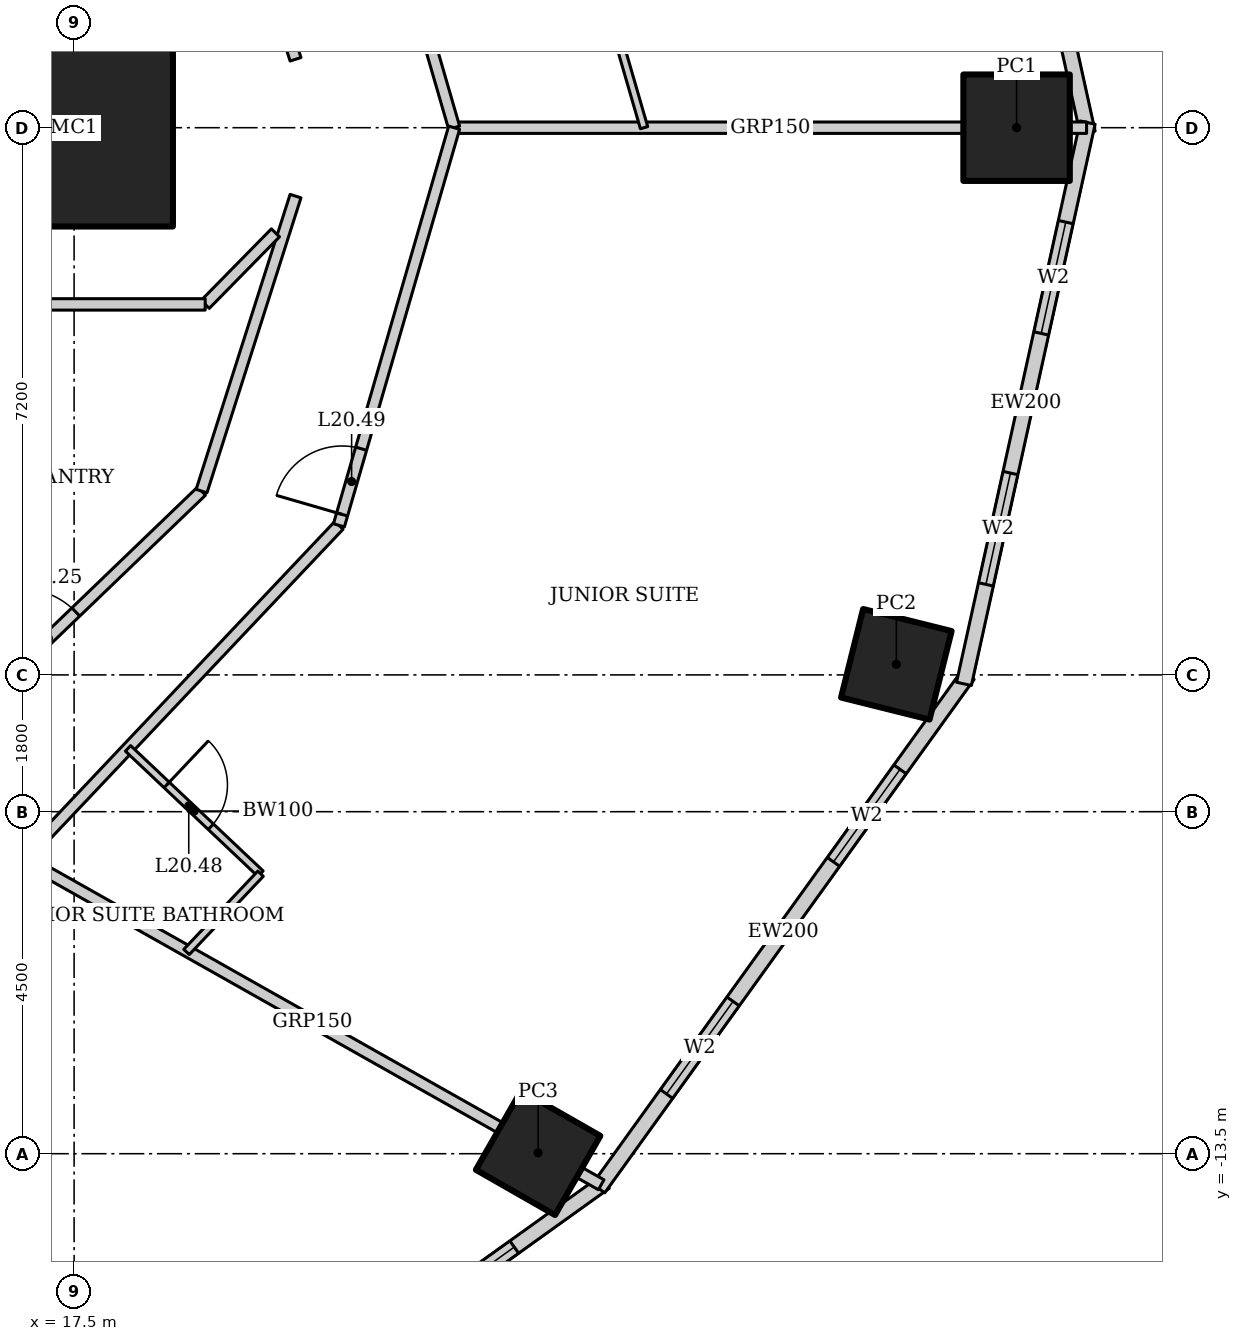
"""IFC4 building model, lengths in metres.
Left out: names, types, materials, properties, quantities, classifications, styles, units other than length and angle.
Written with IfcOpenShell. Run it as: python <this file> out.ifc"""

import sys

from ifc_helpers import new_model, si_unit, direction, frame, frame_2d, origin, origin_2d, place, context, subcontext, project, spatial, rectangle, hollow_rectangle, extrude, element, fill, save


model = new_model("IFC4")
c1 = context("Model", 3, precision=1e-05, world=origin(), true_north=direction((0.0, 1.0)))
c2 = subcontext(c1, "Body", "Model", "MODEL_VIEW")
j1 = project(units=[si_unit("LENGTHUNIT", "METRE"), si_unit("PLANEANGLEUNIT", "RADIAN")], contexts=[c1])
p1 = place(None, origin())
s1 = spatial("IfcSite", under=j1, at=p1, CompositionType="ELEMENT")
p2 = place(p1, origin())
s2 = spatial("IfcBuilding", under=s1, at=p2, CompositionType="ELEMENT")
p3 = place(p2, frame((0.0, 0.0, 87.4)))
s3 = spatial("IfcBuildingStorey", under=s2, at=p3, CompositionType="ELEMENT", Elevation=87.4)
p4 = place(p3, frame((17.5, 0.0, 0.0), z_axis=(0.0, 0.0, 1.0), x_axis=(1.0, 0.0, 0.0)))
e1 = element("IfcColumn", 1, at=p4, inside=s3, PredefinedType="COLUMN", context=c2, shape_type="SweptSolid", body=[
    extrude(hollow_rectangle(XDim=2.6, YDim=2.6, WallThickness=0.13, at=origin_2d()), origin(), (0.0, 0.0, 1.0), 3.6),
])
p5 = place(p3, frame((29.9, 0.0, 0.0), z_axis=(0.0, 0.0, 1.0), x_axis=(1.0, 0.0, 0.0)))
e2 = element("IfcColumn", 2, at=p5, inside=s3, PredefinedType="COLUMN", context=c2, shape_type="SweptSolid", body=[
    extrude(hollow_rectangle(XDim=1.4, YDim=1.4, WallThickness=0.1, at=origin_2d()), origin(), (0.0, 0.0, 1.0), 3.6),
])
p6 = place(p3, frame((23.605, -13.489, 0.0), z_axis=(0.0, 0.0, 1.0), x_axis=(0.496139221777, 0.86824298017, 0.0)))
e3 = element("IfcColumn", 3, at=p6, inside=s3, PredefinedType="COLUMN", context=c2, shape_type="SweptSolid", body=[
    extrude(hollow_rectangle(XDim=1.2, YDim=1.2, WallThickness=0.12, at=origin_2d()), origin(), (0.0, 0.0, 1.0), 3.6),
])
p7 = place(p3, frame((28.318, -7.06, 0.0), z_axis=(0.0, 0.0, 1.0), x_axis=(0.2419218956, 0.970295726276, 0.0)))
e4 = element("IfcColumn", 4, at=p7, inside=s3, PredefinedType="COLUMN", context=c2, shape_type="SweptSolid", body=[
    extrude(hollow_rectangle(XDim=1.2, YDim=1.2, WallThickness=0.1, at=origin_2d()), origin(), (0.0, 0.0, 1.0), 3.6),
])
p8 = place(p3, frame((30.835, -0.067, 0.0), z_axis=(0.0, 0.0, 1.0), x_axis=(-0.215238065514, 0.976561608478, 0.0)))
e5 = element("IfcWall", 5, at=p8, inside=s3, PredefinedType="SOLIDWALL", context=c2, shape_type="SweptSolid", body=[
    extrude(rectangle(XDim=7.562, YDim=0.2, at=frame_2d((3.781, 0.0))), origin(), (0.0, 0.0, 1.0), 3.45),
])
p9 = place(p8, frame((1.341, 0.0, 0.5)))
e6 = element("IfcOpeningElement", 6, at=p9, cuts=e5, PredefinedType="OPENING", context=c2, shape_type="SweptSolid", body=[
    extrude(rectangle(XDim=1.5, YDim=2.2, at=frame_2d((0.75, 1.1))), frame((0.0, 0.11, 0.0), z_axis=(0.0, -1.0, 0.0), x_axis=(1.0, 0.0, 0.0)), (0.0, 0.0, 1.0), 0.22),
])
p10 = place(p8, frame((4.722, 0.0, 0.5)))
e7 = element("IfcOpeningElement", 7, at=p10, cuts=e5, PredefinedType="OPENING", context=c2, shape_type="SweptSolid", body=[
    extrude(rectangle(XDim=1.5, YDim=2.2, at=frame_2d((0.75, 1.1))), frame((0.0, 0.11, 0.0), z_axis=(0.0, -1.0, 0.0), x_axis=(1.0, 0.0, 0.0)), (0.0, 0.0, 1.0), 0.22),
])
p11 = place(p3, frame((17.929, -18.572, 0.0), z_axis=(0.0, 0.0, 1.0), x_axis=(0.812791321576, 0.582554948112, 0.0)))
e8 = element("IfcWall", 8, at=p11, inside=s3, PredefinedType="SOLIDWALL", context=c2, shape_type="SweptSolid", body=[
    extrude(rectangle(XDim=8.063, YDim=0.2, at=frame_2d((4.032, 0.0))), origin(), (0.0, 0.0, 1.0), 3.45),
])
p12 = place(p11, frame((1.466, 0.0, 0.5)))
e9 = element("IfcOpeningElement", 9, at=p12, cuts=e8, PredefinedType="OPENING", context=c2, shape_type="SweptSolid", body=[
    extrude(rectangle(XDim=1.5, YDim=2.2, at=frame_2d((0.75, 1.1))), frame((0.0, 0.11, 0.0), z_axis=(0.0, -1.0, 0.0), x_axis=(1.0, 0.0, 0.0)), (0.0, 0.0, 1.0), 0.22),
])
p13 = place(p11, frame((5.097, 0.0, 0.5)))
e10 = element("IfcOpeningElement", 10, at=p13, cuts=e8, PredefinedType="OPENING", context=c2, shape_type="SweptSolid", body=[
    extrude(rectangle(XDim=1.5, YDim=2.2, at=frame_2d((0.75, 1.1))), frame((0.0, 0.11, 0.0), z_axis=(0.0, -1.0, 0.0), x_axis=(1.0, 0.0, 0.0)), (0.0, 0.0, 1.0), 0.22),
])
p14 = place(p3, frame((24.4, -13.957, 0.0), z_axis=(0.0, 0.0, 1.0), x_axis=(0.583937613703, 0.811798536155, 0.0)))
e11 = element("IfcWall", 11, at=p14, inside=s3, PredefinedType="SOLIDWALL", context=c2, shape_type="SweptSolid", body=[
    extrude(rectangle(XDim=8.323, YDim=0.2, at=frame_2d((4.162, 0.0))), origin(), (0.0, 0.0, 1.0), 3.45),
])
p15 = place(p14, frame((1.531, 0.0, 0.5)))
e12 = element("IfcOpeningElement", 12, at=p15, cuts=e11, PredefinedType="OPENING", context=c2, shape_type="SweptSolid", body=[
    extrude(rectangle(XDim=1.5, YDim=2.2, at=frame_2d((0.75, 1.1))), frame((0.0, 0.11, 0.0), z_axis=(0.0, -1.0, 0.0), x_axis=(1.0, 0.0, 0.0)), (0.0, 0.0, 1.0), 0.22),
])
p16 = place(p14, frame((5.292, 0.0, 0.5)))
e13 = element("IfcOpeningElement", 13, at=p16, cuts=e11, PredefinedType="OPENING", context=c2, shape_type="SweptSolid", body=[
    extrude(rectangle(XDim=1.5, YDim=2.2, at=frame_2d((0.75, 1.1))), frame((0.0, 0.11, 0.0), z_axis=(0.0, -1.0, 0.0), x_axis=(1.0, 0.0, 0.0)), (0.0, 0.0, 1.0), 0.22),
])
p17 = place(p3, frame((29.208, -7.318, 0.0), z_axis=(0.0, 0.0, 1.0), x_axis=(0.215238065514, 0.976561608478, 0.0)))
e14 = element("IfcWall", 14, at=p17, inside=s3, PredefinedType="SOLIDWALL", context=c2, shape_type="SweptSolid", body=[
    extrude(rectangle(XDim=7.562, YDim=0.2, at=frame_2d((3.781, 0.0))), origin(), (0.0, 0.0, 1.0), 3.45),
])
p18 = place(p17, frame((1.341, 0.0, 0.5)))
e15 = element("IfcOpeningElement", 15, at=p18, cuts=e14, PredefinedType="OPENING", context=c2, shape_type="SweptSolid", body=[
    extrude(rectangle(XDim=1.5, YDim=2.2, at=frame_2d((0.75, 1.1))), frame((0.0, 0.11, 0.0), z_axis=(0.0, -1.0, 0.0), x_axis=(1.0, 0.0, 0.0)), (0.0, 0.0, 1.0), 0.22),
])
p19 = place(p17, frame((4.722, 0.0, 0.5)))
e16 = element("IfcOpeningElement", 16, at=p19, cuts=e14, PredefinedType="OPENING", context=c2, shape_type="SweptSolid", body=[
    extrude(rectangle(XDim=1.5, YDim=2.2, at=frame_2d((0.75, 1.1))), frame((0.0, 0.11, 0.0), z_axis=(0.0, -1.0, 0.0), x_axis=(1.0, 0.0, 0.0)), (0.0, 0.0, 1.0), 0.22),
])
p20 = place(p3, frame((30.821, 0.0, 0.0), z_axis=(0.0, 0.0, 1.0), x_axis=(-1.0, 0.0, 0.0)))
e17 = element("IfcWall", 17, at=p20, inside=s3, PredefinedType="PARTITIONING", context=c2, shape_type="SweptSolid", body=[
    extrude(rectangle(XDim=8.321, YDim=0.15, at=frame_2d((4.16, 0.0))), origin(), (0.0, 0.0, 1.0), 2.528),
])
p21 = place(p3, frame((24.435, -13.909, 0.0), z_axis=(0.0, 0.0, 1.0), x_axis=(-0.87090601027, 0.491449612143, 0.0)))
e18 = element("IfcWall", 18, at=p21, inside=s3, PredefinedType="PARTITIONING", context=c2, shape_type="SweptSolid", body=[
    extrude(rectangle(XDim=8.726, YDim=0.15, at=frame_2d((4.363, 0.0))), origin(), (0.0, 0.0, 1.0), 2.693),
])
p22 = place(p3, frame((22.5, 0.0, 0.0), z_axis=(0.0, 0.0, 1.0), x_axis=(-0.278247435376, 0.960509429785, 0.0)))
e19 = element("IfcWall", 19, at=p22, inside=s3, PredefinedType="PARTITIONING", context=c2, shape_type="SweptSolid", body=[
    extrude(rectangle(XDim=5.447, YDim=0.15, at=frame_2d((2.724, 0.0))), origin(), (0.0, 0.0, 1.0), 3.45),
])
p23 = place(p3, frame((16.835, -9.62, 0.0), z_axis=(0.0, 0.0, 1.0), x_axis=(0.687062608696, 0.726598218916, 0.0)))
e20 = element("IfcWall", 20, at=p23, inside=s3, PredefinedType="PARTITIONING", context=c2, shape_type="SweptSolid", body=[
    extrude(rectangle(XDim=6.039, YDim=0.15, at=frame_2d((3.02, 0.0))), origin(), (0.0, 0.0, 1.0), 3.45),
])
p24 = place(p3, frame((20.984, -5.232, 0.0), z_axis=(0.0, 0.0, 1.0), x_axis=(0.278247435376, 0.960509429785, 0.0)))
e21 = element("IfcWall", 21, at=p24, inside=s3, PredefinedType="PARTITIONING", context=c2, shape_type="SweptSolid", body=[
    extrude(rectangle(XDim=5.447, YDim=0.15, at=frame_2d((2.724, 0.0))), origin(), (0.0, 0.0, 1.0), 3.45),
])
p25 = place(p24, frame((0.15, 0.0, 0.0)))
e22 = element("IfcOpeningElement", 22, at=p25, cuts=e21, PredefinedType="OPENING", context=c2, shape_type="SweptSolid", body=[
    extrude(rectangle(XDim=0.9, YDim=2.1, at=frame_2d((0.45, 1.05))), frame((0.0, 0.085, 0.0), z_axis=(0.0, -1.0, 0.0), x_axis=(1.0, 0.0, 0.0)), (0.0, 0.0, 1.0), 0.17),
])
p26 = place(p3, frame((20.413, 0.9, 0.0), z_axis=(0.0, 0.0, 1.0), x_axis=(-0.303505448228, 0.952829702988, 0.0)))
e23 = element("IfcWall", 23, at=p26, inside=s3, PredefinedType="PARTITIONING", context=c2, shape_type="SweptSolid", body=[
    extrude(rectangle(XDim=4.073, YDim=0.15, at=frame_2d((2.037, 0.0))), origin(), (0.0, 0.0, 1.0), 3.45),
])
p27 = place(p3, frame((15.147, -8.656, 0.0), z_axis=(0.0, 0.0, 1.0), x_axis=(0.720837261072, 0.693104352209, 0.0)))
e24 = element("IfcWall", 24, at=p27, inside=s3, PredefinedType="PARTITIONING", context=c2, shape_type="SweptSolid", body=[
    extrude(rectangle(XDim=5.59, YDim=0.15, at=frame_2d((2.795, 0.0))), origin(), (0.0, 0.0, 1.0), 3.45),
])
p28 = place(p27, frame((2.295, 0.0, 0.0)))
e25 = element("IfcOpeningElement", 25, at=p28, cuts=e24, PredefinedType="OPENING", context=c2, shape_type="SweptSolid", body=[
    extrude(rectangle(XDim=1.0, YDim=2.1, at=frame_2d((0.5, 1.05))), frame((0.0, 0.085, 0.0), z_axis=(0.0, -1.0, 0.0), x_axis=(1.0, 0.0, 0.0)), (0.0, 0.0, 1.0), 0.17),
])
p29 = place(p3, frame((19.177, -4.781, 0.0), z_axis=(0.0, 0.0, 1.0), x_axis=(0.303505448228, 0.952829702988, 0.0)))
e26 = element("IfcWall", 26, at=p29, inside=s3, PredefinedType="PARTITIONING", context=c2, shape_type="SweptSolid", body=[
    extrude(rectangle(XDim=4.073, YDim=0.15, at=frame_2d((2.037, 0.0))), origin(), (0.0, 0.0, 1.0), 3.45),
])
p30 = place(p3, frame((24.249, 2.589, 0.0), z_axis=(0.0, 0.0, 1.0), x_axis=(0.278260412958, -0.960505670249, 0.0)))
e27 = element("IfcWall", 27, at=p30, inside=s3, PredefinedType="PARTITIONING", context=c2, shape_type="SweptSolid", body=[
    extrude(rectangle(XDim=2.695, YDim=0.1, at=frame_2d((1.348, 0.0))), origin(), (0.0, 0.0, 1.0), 3.45),
])
p31 = place(p3, frame((18.209, -8.167, 0.0), z_axis=(0.0, 0.0, 1.0), x_axis=(0.726567238928, -0.687095369885, 0.0)))
e28 = element("IfcWall", 28, at=p31, inside=s3, PredefinedType="PARTITIONING", context=c2, shape_type="SweptSolid", body=[
    extrude(rectangle(XDim=2.4, YDim=0.1, at=frame_2d((1.2, 0.0))), origin(), (0.0, 0.0, 1.0), 3.45),
])
p32 = place(p31, frame((0.7, 0.0, 0.0)))
e29 = element("IfcOpeningElement", 29, at=p32, cuts=e28, PredefinedType="OPENING", context=c2, shape_type="SweptSolid", body=[
    extrude(rectangle(XDim=0.8, YDim=2.1, at=frame_2d((0.4, 1.05))), frame((0.0, 0.06, 0.0), z_axis=(0.0, -1.0, 0.0), x_axis=(1.0, 0.0, 0.0)), (0.0, 0.0, 1.0), 0.12),
])
p33 = place(p3, frame((19.953, -9.816, 0.0), z_axis=(0.0, 0.0, 1.0), x_axis=(-0.687017997787, -0.726640399866, 0.0)))
e30 = element("IfcWall", 30, at=p33, inside=s3, PredefinedType="PARTITIONING", context=c2, shape_type="SweptSolid", body=[
    extrude(rectangle(XDim=1.417, YDim=0.1, at=frame_2d((0.708, 0.0))), origin(), (0.0, 0.0, 1.0), 3.45),
])
p34 = place(p3, frame((20.149, -1.384, 0.0), z_axis=(0.0, 0.0, 1.0), x_axis=(-0.700694560486, -0.713461374501, 0.0)))
e31 = element("IfcWall", 31, at=p34, inside=s3, PredefinedType="PARTITIONING", context=c2, shape_type="SweptSolid", body=[
    extrude(rectangle(XDim=1.32, YDim=0.15, at=frame_2d((0.66, 0.0))), origin(), (0.0, 0.0, 1.0), 3.45),
])
p35 = place(p3, frame((19.225, -2.325, 0.0), z_axis=(0.0, 0.0, 1.0), x_axis=(-1.0, 0.0, 0.0)))
e32 = element("IfcWall", 32, at=p35, inside=s3, PredefinedType="PARTITIONING", context=c2, shape_type="SweptSolid", body=[
    extrude(rectangle(XDim=3.449, YDim=0.15, at=frame_2d((1.725, 0.0))), origin(), (0.0, 0.0, 1.0), 3.45),
])
p36 = place(p13, origin())
e33 = element("IfcWindow", 33, at=p36, inside=s3, PartitioningType="SINGLE_PANEL", PredefinedType="WINDOW", context=c2, shape_type="SweptSolid", body=[
    extrude(rectangle(XDim=1.5, YDim=2.2, at=frame_2d((0.75, 1.1))), frame((0.0, 0.03, 0.0), z_axis=(0.0, -1.0, 0.0), x_axis=(1.0, 0.0, 0.0)), (0.0, 0.0, 1.0), 0.06),
])
fill(e10, e33)
p37 = place(p15, origin())
e34 = element("IfcWindow", 34, at=p37, inside=s3, PartitioningType="SINGLE_PANEL", PredefinedType="WINDOW", context=c2, shape_type="SweptSolid", body=[
    extrude(rectangle(XDim=1.5, YDim=2.2, at=frame_2d((0.75, 1.1))), frame((0.0, 0.03, 0.0), z_axis=(0.0, -1.0, 0.0), x_axis=(1.0, 0.0, 0.0)), (0.0, 0.0, 1.0), 0.06),
])
fill(e12, e34)
p38 = place(p16, origin())
e35 = element("IfcWindow", 35, at=p38, inside=s3, PartitioningType="SINGLE_PANEL", PredefinedType="WINDOW", context=c2, shape_type="SweptSolid", body=[
    extrude(rectangle(XDim=1.5, YDim=2.2, at=frame_2d((0.75, 1.1))), frame((0.0, 0.03, 0.0), z_axis=(0.0, -1.0, 0.0), x_axis=(1.0, 0.0, 0.0)), (0.0, 0.0, 1.0), 0.06),
])
fill(e13, e35)
p39 = place(p18, origin())
e36 = element("IfcWindow", 36, at=p39, inside=s3, PartitioningType="SINGLE_PANEL", PredefinedType="WINDOW", context=c2, shape_type="SweptSolid", body=[
    extrude(rectangle(XDim=1.5, YDim=2.2, at=frame_2d((0.75, 1.1))), frame((0.0, 0.03, 0.0), z_axis=(0.0, -1.0, 0.0), x_axis=(1.0, 0.0, 0.0)), (0.0, 0.0, 1.0), 0.06),
])
fill(e15, e36)
p40 = place(p19, origin())
e37 = element("IfcWindow", 37, at=p40, inside=s3, PartitioningType="SINGLE_PANEL", PredefinedType="WINDOW", context=c2, shape_type="SweptSolid", body=[
    extrude(rectangle(XDim=1.5, YDim=2.2, at=frame_2d((0.75, 1.1))), frame((0.0, 0.03, 0.0), z_axis=(0.0, -1.0, 0.0), x_axis=(1.0, 0.0, 0.0)), (0.0, 0.0, 1.0), 0.06),
])
fill(e16, e37)
p41 = place(p28, origin())
e38 = element("IfcDoor", 38, at=p41, inside=s3, OperationType="SINGLE_SWING_LEFT", PredefinedType="DOOR", context=c2, shape_type="SweptSolid", body=[
    extrude(rectangle(XDim=1.0, YDim=2.1, at=frame_2d((0.5, 1.05))), frame((0.0, 0.025, 0.0), z_axis=(0.0, -1.0, 0.0), x_axis=(1.0, 0.0, 0.0)), (0.0, 0.0, 1.0), 0.05),
])
fill(e25, e38)
p42 = place(p32, origin())
e39 = element("IfcDoor", 39, at=p42, inside=s3, OperationType="SINGLE_SWING_LEFT", PredefinedType="DOOR", context=c2, shape_type="SweptSolid", body=[
    extrude(rectangle(XDim=0.8, YDim=2.1, at=frame_2d((0.4, 1.05))), frame((0.0, 0.025, 0.0), z_axis=(0.0, -1.0, 0.0), x_axis=(1.0, 0.0, 0.0)), (0.0, 0.0, 1.0), 0.05),
])
fill(e29, e39)
p43 = place(p25, origin())
e40 = element("IfcDoor", 40, at=p43, inside=s3, OperationType="SINGLE_SWING_LEFT", PredefinedType="DOOR", context=c2, shape_type="SweptSolid", body=[
    extrude(rectangle(XDim=0.9, YDim=2.1, at=frame_2d((0.45, 1.05))), frame((0.0, 0.025, 0.0), z_axis=(0.0, -1.0, 0.0), x_axis=(1.0, 0.0, 0.0)), (0.0, 0.0, 1.0), 0.05),
])
fill(e22, e40)
save(model, sys.argv[1])
